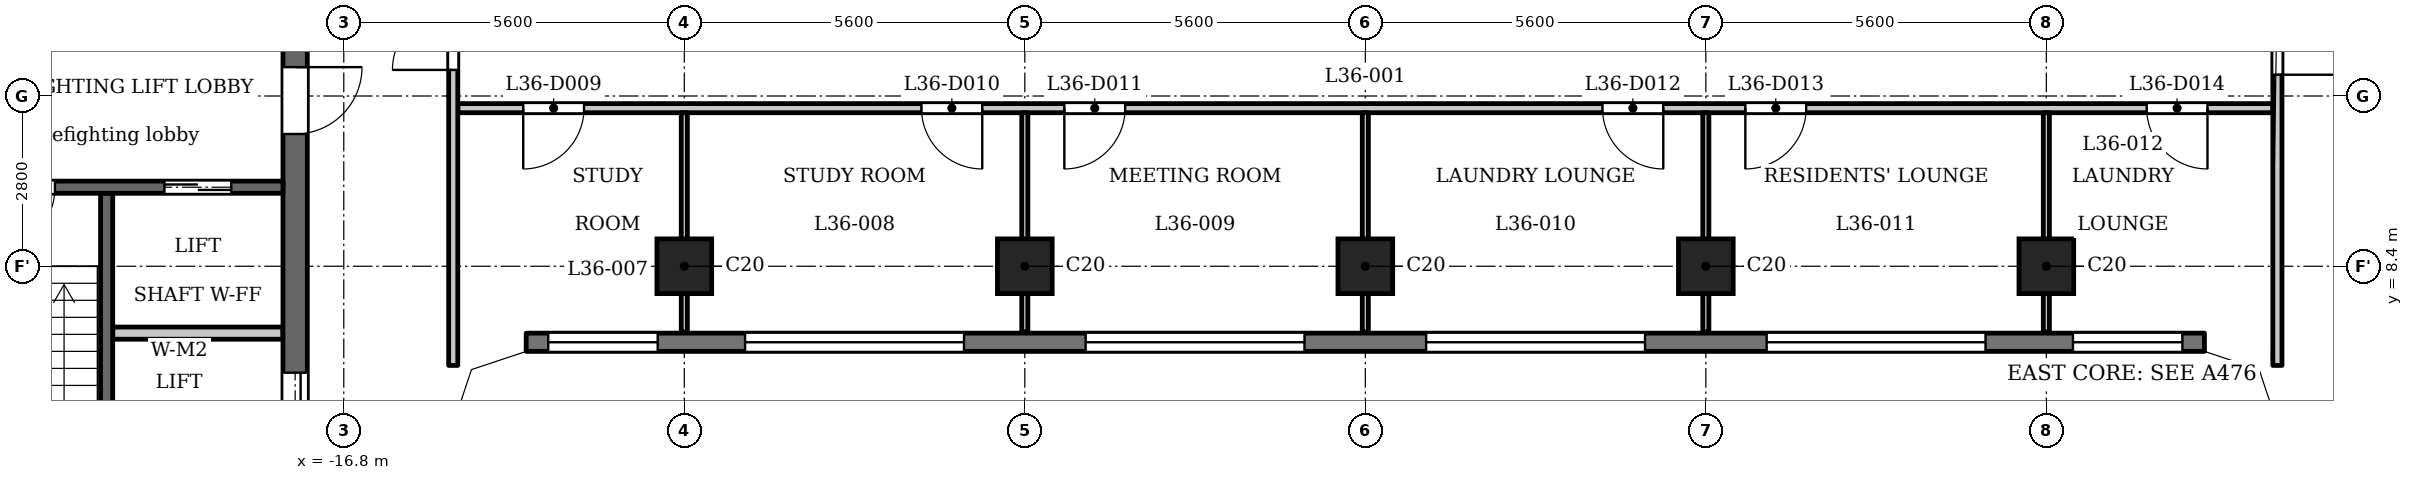
"""IFC4 building model, lengths in metres.
Left out: names, types, materials, properties, quantities, classifications, styles, units other than length and angle.
Written with IfcOpenShell. Run it as: python <this file> out.ifc"""

import sys

from ifc_helpers import new_model, si_unit, direction, frame, frame_2d, origin, origin_2d, place, context, subcontext, project, spatial, polyline, rectangle, outline, extrude, element, fill, save


model = new_model("IFC4")
c1 = context("Model", 3, precision=1e-05, world=origin(), true_north=direction((0.0, 1.0)))
c2 = subcontext(c1, "Body", "Model", "MODEL_VIEW")
j1 = project(units=[si_unit("LENGTHUNIT", "METRE"), si_unit("PLANEANGLEUNIT", "RADIAN")], contexts=[c1])
p1 = place(None, origin())
s1 = spatial("IfcSite", under=j1, at=p1, CompositionType="ELEMENT")
p2 = place(p1, origin())
s2 = spatial("IfcBuilding", under=s1, at=p2, CompositionType="ELEMENT")
p3 = place(p2, frame((0.0, 0.0, 143.1)))
s3 = spatial("IfcBuildingStorey", under=s2, at=p3, CompositionType="ELEMENT", Elevation=143.1)
for number, where, z_axis, x_axis in (
    (1, (-11.2, 8.4, 0.0), (0.0, 0.0, 1.0), (1.0, 0.0, 0.0)),
    (2, (-5.6, 8.4, 0.0), (0.0, 0.0, 1.0), (1.0, 0.0, 0.0)),
    (3, (0.0, 8.4, 0.0), (0.0, 0.0, 1.0), (1.0, 0.0, 0.0)),
    (4, (5.6, 8.4, 0.0), (0.0, 0.0, 1.0), (1.0, 0.0, 0.0)),
    (5, (11.2, 8.4, 0.0), (0.0, 0.0, 1.0), (1.0, 0.0, 0.0)),
):
    element("IfcColumn", number, at=place(p3, frame(where, z_axis=z_axis, x_axis=x_axis)), inside=s3, PredefinedType="COLUMN", context=c2, shape_type="SweptSolid", body=[
        extrude(rectangle(XDim=0.9, YDim=0.9, at=origin_2d()), origin(), (0.0, 0.0, 1.0), 3.5),
    ])
p4 = place(p3, frame((-13.8, 7.15, 0.0), z_axis=(0.0, 0.0, 1.0), x_axis=(1.0, 0.0, 0.0)))
e6 = element("IfcWall", 6, at=p4, inside=s3, PredefinedType="SOLIDWALL", context=c2, shape_type="SweptSolid", body=[
    extrude(rectangle(XDim=27.6, YDim=0.3, at=frame_2d((13.8, 0.0))), origin(), (0.0, 0.0, 1.0), 3.2),
])
p5 = place(p4, frame((0.363, 0.0, 0.9)))
e7 = element("IfcOpeningElement", 7, at=p5, cuts=e6, PredefinedType="OPENING", context=c2, shape_type="SweptSolid", body=[
    extrude(rectangle(XDim=1.8, YDim=1.25, at=frame_2d((0.9, 0.625))), frame((0.0, 0.16, 0.0), z_axis=(0.0, -1.0, 0.0), x_axis=(1.0, 0.0, 0.0)), (0.0, 0.0, 1.0), 0.32),
])
p6 = place(p4, frame((3.6, 0.0, 1.2)))
e8 = element("IfcOpeningElement", 8, at=p6, cuts=e6, PredefinedType="OPENING", context=c2, shape_type="SweptSolid", body=[
    extrude(rectangle(XDim=3.6, YDim=0.95, at=frame_2d((1.8, 0.475))), frame((0.0, 0.16, 0.0), z_axis=(0.0, -1.0, 0.0), x_axis=(1.0, 0.0, 0.0)), (0.0, 0.0, 1.0), 0.32),
])
p7 = place(p4, frame((9.2, 0.0, 1.2)))
e9 = element("IfcOpeningElement", 9, at=p7, cuts=e6, PredefinedType="OPENING", context=c2, shape_type="SweptSolid", body=[
    extrude(rectangle(XDim=3.6, YDim=0.95, at=frame_2d((1.8, 0.475))), frame((0.0, 0.16, 0.0), z_axis=(0.0, -1.0, 0.0), x_axis=(1.0, 0.0, 0.0)), (0.0, 0.0, 1.0), 0.32),
])
p8 = place(p4, frame((14.8, 0.0, 1.2)))
e10 = element("IfcOpeningElement", 10, at=p8, cuts=e6, PredefinedType="OPENING", context=c2, shape_type="SweptSolid", body=[
    extrude(rectangle(XDim=3.6, YDim=0.95, at=frame_2d((1.8, 0.475))), frame((0.0, 0.16, 0.0), z_axis=(0.0, -1.0, 0.0), x_axis=(1.0, 0.0, 0.0)), (0.0, 0.0, 1.0), 0.32),
])
p9 = place(p4, frame((20.4, 0.0, 1.2)))
e11 = element("IfcOpeningElement", 11, at=p9, cuts=e6, PredefinedType="OPENING", context=c2, shape_type="SweptSolid", body=[
    extrude(rectangle(XDim=3.6, YDim=0.95, at=frame_2d((1.8, 0.475))), frame((0.0, 0.16, 0.0), z_axis=(0.0, -1.0, 0.0), x_axis=(1.0, 0.0, 0.0)), (0.0, 0.0, 1.0), 0.32),
])
p10 = place(p4, frame((25.438, 0.0, 0.9)))
e12 = element("IfcOpeningElement", 12, at=p10, cuts=e6, PredefinedType="OPENING", context=c2, shape_type="SweptSolid", body=[
    extrude(rectangle(XDim=1.8, YDim=1.25, at=frame_2d((0.9, 0.625))), frame((0.0, 0.16, 0.0), z_axis=(0.0, -1.0, 0.0), x_axis=(1.0, 0.0, 0.0)), (0.0, 0.0, 1.0), 0.32),
])
p11 = place(p3, frame((-20.7, 2.6, 0.0), z_axis=(0.0, 0.0, 1.0), x_axis=(0.0, 1.0, 0.0)))
e13 = element("IfcWall", 13, at=p11, inside=s3, PredefinedType="SHEAR", context=c2, shape_type="SweptSolid", body=[
    extrude(rectangle(XDim=7.0, YDim=0.2, at=frame_2d((3.5, 0.0))), origin(), (0.0, 0.0, 1.0), 3.2),
])
p12 = place(p3, frame((-17.6, -12.45, 0.0), z_axis=(0.0, 0.0, 1.0), x_axis=(0.0, 1.0, 0.0)))
e14 = element("IfcWall", 14, at=p12, inside=s3, PredefinedType="SHEAR", context=c2, shape_type="SweptSolid", body=[
    extrude(rectangle(XDim=24.9, YDim=0.4, at=frame_2d((12.45, 0.0))), origin(), (0.0, 0.0, 1.0), 3.2),
])
p13 = place(p12, frame((8.65, 0.0, 0.0)))
e15 = element("IfcOpeningElement", 15, at=p13, cuts=e14, PredefinedType="OPENING", context=c2, shape_type="SweptSolid", body=[
    extrude(rectangle(XDim=0.9, YDim=2.1, at=frame_2d((0.45, 1.05))), frame((0.0, 0.21, 0.0), z_axis=(0.0, -1.0, 0.0), x_axis=(1.0, 0.0, 0.0)), (0.0, 0.0, 1.0), 0.42),
])
p14 = place(p12, frame((15.6, 0.0, 0.0)))
e16 = element("IfcOpeningElement", 16, at=p14, cuts=e14, PredefinedType="OPENING", context=c2, shape_type="SweptSolid", body=[
    extrude(rectangle(XDim=1.1, YDim=2.1, at=frame_2d((0.55, 1.05))), frame((0.0, 0.21, 0.0), z_axis=(0.0, -1.0, 0.0), x_axis=(1.0, 0.0, 0.0)), (0.0, 0.0, 1.0), 0.42),
])
p15 = place(p12, frame((18.0, 0.0, 0.0)))
e17 = element("IfcOpeningElement", 17, at=p15, cuts=e14, PredefinedType="OPENING", context=c2, shape_type="SweptSolid", body=[
    extrude(rectangle(XDim=1.1, YDim=2.1, at=frame_2d((0.55, 1.05))), frame((0.0, 0.21, 0.0), z_axis=(0.0, -1.0, 0.0), x_axis=(1.0, 0.0, 0.0)), (0.0, 0.0, 1.0), 0.42),
])
p16 = place(p12, frame((23.025, 0.0, 0.0)))
e18 = element("IfcOpeningElement", 18, at=p16, cuts=e14, PredefinedType="OPENING", context=c2, shape_type="SweptSolid", body=[
    extrude(rectangle(XDim=1.1, YDim=2.1, at=frame_2d((0.55, 1.05))), frame((0.0, 0.21, 0.0), z_axis=(0.0, -1.0, 0.0), x_axis=(1.0, 0.0, 0.0)), (0.0, 0.0, 1.0), 0.42),
])
p17 = place(p12, frame((0.775, 0.0, 0.0)))
e19 = element("IfcOpeningElement", 19, at=p17, cuts=e14, PredefinedType="OPENING", context=c2, shape_type="SweptSolid", body=[
    extrude(rectangle(XDim=1.1, YDim=2.1, at=frame_2d((0.55, 1.05))), frame((0.0, 0.21, 0.0), z_axis=(0.0, -1.0, 0.0), x_axis=(1.0, 0.0, 0.0)), (0.0, 0.0, 1.0), 0.42),
])
p18 = place(p12, frame((12.925, 0.0, 0.0)))
e20 = element("IfcOpeningElement", 20, at=p18, cuts=e14, PredefinedType="OPENING", context=c2, shape_type="SweptSolid", body=[
    extrude(rectangle(XDim=1.8, YDim=2.1, at=frame_2d((0.9, 1.05))), frame((0.0, 0.21, 0.0), z_axis=(0.0, -1.0, 0.0), x_axis=(1.0, 0.0, 0.0)), (0.0, 0.0, 1.0), 0.42),
])
p19 = place(p3, frame((-17.8, 7.3, 0.0), z_axis=(0.0, 0.0, 1.0), x_axis=(-1.0, 0.0, 0.0)))
e21 = element("IfcWall", 21, at=p19, inside=s3, PredefinedType="PARTITIONING", context=c2, shape_type="SweptSolid", body=[
    extrude(rectangle(XDim=2.8, YDim=0.2, at=frame_2d((1.4, 0.0))), origin(), (0.0, 0.0, 1.0), 3.2),
])
p20 = place(p3, frame((-17.8, 9.7, 0.0), z_axis=(0.0, 0.0, 1.0), x_axis=(-1.0, 0.0, 0.0)))
e22 = element("IfcWall", 22, at=p20, inside=s3, PredefinedType="SHEAR", context=c2, shape_type="SweptSolid", body=[
    extrude(rectangle(XDim=8.45, YDim=0.2, at=frame_2d((4.225, 0.0))), origin(), (0.0, 0.0, 1.0), 3.2),
])
p21 = place(p20, frame((0.85, 0.0, 0.0)))
e23 = element("IfcOpeningElement", 23, at=p21, cuts=e22, PredefinedType="OPENING", context=c2, shape_type="SweptSolid", body=[
    extrude(rectangle(XDim=1.1, YDim=2.1, at=frame_2d((0.55, 1.05))), frame((0.0, 0.11, 0.0), z_axis=(0.0, -1.0, 0.0), x_axis=(1.0, 0.0, 0.0)), (0.0, 0.0, 1.0), 0.22),
])
p22 = place(p20, frame((3.75, 0.0, 0.0)))
e24 = element("IfcOpeningElement", 24, at=p22, cuts=e22, PredefinedType="OPENING", context=c2, shape_type="SweptSolid", body=[
    extrude(rectangle(XDim=1.1, YDim=2.1, at=frame_2d((0.55, 1.05))), frame((0.0, 0.11, 0.0), z_axis=(0.0, -1.0, 0.0), x_axis=(1.0, 0.0, 0.0)), (0.0, 0.0, 1.0), 0.22),
])
p23 = place(p3, frame((-14.925, 11.0, 0.0), z_axis=(0.0, 0.0, 1.0), x_axis=(1.0, 0.0, 0.0)))
e25 = element("IfcWall", 25, at=p23, inside=s3, PredefinedType="PARTITIONING", context=c2, shape_type="SweptSolid", body=[
    extrude(rectangle(XDim=29.85, YDim=0.15, at=frame_2d((14.925, 0.0))), origin(), (0.0, 0.0, 1.0), 3.2),
])
p24 = place(p23, frame((1.076, 0.0, 0.0)))
e26 = element("IfcOpeningElement", 26, at=p24, cuts=e25, PredefinedType="OPENING", context=c2, shape_type="SweptSolid", body=[
    extrude(rectangle(XDim=1.0, YDim=2.1, at=frame_2d((0.5, 1.05))), frame((0.0, 0.085, 0.0), z_axis=(0.0, -1.0, 0.0), x_axis=(1.0, 0.0, 0.0)), (0.0, 0.0, 1.0), 0.17),
])
p25 = place(p23, frame((7.625, 0.0, 0.0)))
e27 = element("IfcOpeningElement", 27, at=p25, cuts=e25, PredefinedType="OPENING", context=c2, shape_type="SweptSolid", body=[
    extrude(rectangle(XDim=1.0, YDim=2.1, at=frame_2d((0.5, 1.05))), frame((0.0, 0.085, 0.0), z_axis=(0.0, -1.0, 0.0), x_axis=(1.0, 0.0, 0.0)), (0.0, 0.0, 1.0), 0.17),
])
p26 = place(p23, frame((9.975, 0.0, 0.0)))
e28 = element("IfcOpeningElement", 28, at=p26, cuts=e25, PredefinedType="OPENING", context=c2, shape_type="SweptSolid", body=[
    extrude(rectangle(XDim=1.0, YDim=2.1, at=frame_2d((0.5, 1.05))), frame((0.0, 0.085, 0.0), z_axis=(0.0, -1.0, 0.0), x_axis=(1.0, 0.0, 0.0)), (0.0, 0.0, 1.0), 0.17),
])
p27 = place(p23, frame((18.825, 0.0, 0.0)))
e29 = element("IfcOpeningElement", 29, at=p27, cuts=e25, PredefinedType="OPENING", context=c2, shape_type="SweptSolid", body=[
    extrude(rectangle(XDim=1.0, YDim=2.1, at=frame_2d((0.5, 1.05))), frame((0.0, 0.085, 0.0), z_axis=(0.0, -1.0, 0.0), x_axis=(1.0, 0.0, 0.0)), (0.0, 0.0, 1.0), 0.17),
])
p28 = place(p23, frame((21.175, 0.0, 0.0)))
e30 = element("IfcOpeningElement", 30, at=p28, cuts=e25, PredefinedType="OPENING", context=c2, shape_type="SweptSolid", body=[
    extrude(rectangle(XDim=1.0, YDim=2.1, at=frame_2d((0.5, 1.05))), frame((0.0, 0.085, 0.0), z_axis=(0.0, -1.0, 0.0), x_axis=(1.0, 0.0, 0.0)), (0.0, 0.0, 1.0), 0.17),
])
p29 = place(p23, frame((27.775, 0.0, 0.0)))
e31 = element("IfcOpeningElement", 31, at=p29, cuts=e25, PredefinedType="OPENING", context=c2, shape_type="SweptSolid", body=[
    extrude(rectangle(XDim=1.0, YDim=2.1, at=frame_2d((0.5, 1.05))), frame((0.0, 0.085, 0.0), z_axis=(0.0, -1.0, 0.0), x_axis=(1.0, 0.0, 0.0)), (0.0, 0.0, 1.0), 0.17),
])
p30 = place(p3, frame((-15.0, 6.769, 0.0), z_axis=(0.0, 0.0, 1.0), x_axis=(0.0, 1.0, 0.0)))
e32 = element("IfcWall", 32, at=p30, inside=s3, PredefinedType="PARTITIONING", context=c2, shape_type="SweptSolid", body=[
    extrude(rectangle(XDim=6.356, YDim=0.15, at=frame_2d((3.178, 0.0))), origin(), (0.0, 0.0, 1.0), 3.2),
])
p31 = place(p30, frame((4.86, 0.0, 0.0)))
e33 = element("IfcOpeningElement", 33, at=p31, cuts=e32, PredefinedType="OPENING", context=c2, shape_type="SweptSolid", body=[
    extrude(rectangle(XDim=1.0, YDim=2.1, at=frame_2d((0.5, 1.05))), frame((0.0, 0.085, 0.0), z_axis=(0.0, -1.0, 0.0), x_axis=(1.0, 0.0, 0.0)), (0.0, 0.0, 1.0), 0.17),
])
for number, where, z_axis, x_axis in (
    (34, (-11.2, 7.32, 0.0), (0.0, 0.0, 1.0), (0.0, 1.0, 0.0)),
    (35, (-5.6, 7.32, 0.0), (0.0, 0.0, 1.0), (0.0, 1.0, 0.0)),
    (36, (0.0, 7.32, 0.0), (0.0, 0.0, 1.0), (0.0, 1.0, 0.0)),
    (37, (5.6, 7.32, 0.0), (0.0, 0.0, 1.0), (0.0, 1.0, 0.0)),
    (38, (11.2, 7.32, 0.0), (0.0, 0.0, 1.0), (0.0, 1.0, 0.0)),
):
    element("IfcWall", number, at=place(p3, frame(where, z_axis=z_axis, x_axis=x_axis)), inside=s3, PredefinedType="PARTITIONING", context=c2, shape_type="SweptSolid", body=[
        extrude(rectangle(XDim=3.605, YDim=0.1, at=frame_2d((1.802, 0.0))), origin(), (0.0, 0.0, 1.0), 3.2),
    ])
p32 = place(p3, frame((15.0, 6.769, 0.0), z_axis=(0.0, 0.0, 1.0), x_axis=(0.0, 1.0, 0.0)))
e39 = element("IfcWall", 39, at=p32, inside=s3, PredefinedType="PARTITIONING", context=c2, shape_type="SweptSolid", body=[
    extrude(rectangle(XDim=6.356, YDim=0.15, at=frame_2d((3.178, 0.0))), origin(), (0.0, 0.0, 1.0), 3.2),
])
p33 = place(p32, frame((4.781, 0.0, 0.0)))
e40 = element("IfcOpeningElement", 40, at=p33, cuts=e39, PredefinedType="OPENING", context=c2, shape_type="SweptSolid", body=[
    extrude(rectangle(XDim=1.0, YDim=2.1, at=frame_2d((0.5, 1.05))), frame((0.0, 0.085, 0.0), z_axis=(0.0, -1.0, 0.0), x_axis=(1.0, 0.0, 0.0)), (0.0, 0.0, 1.0), 0.17),
])
p34 = place(p3, origin())
e41 = element("IfcWall", 41, at=p34, inside=s3, PredefinedType="SOLIDWALL", context=c2, shape_type="SweptSolid", body=[
    extrude(outline(polyline([(-13.849, 7.3), (-14.937, 6.937), (-15.3, 5.849), (-15.3, 5.8), (-15.0, 5.8), (-14.7, 6.7), (-13.8, 7.0), (-13.8, 7.3), (-13.849, 7.3)])), origin(), (0.0, 0.0, 1.0), 3.2),
])
e42 = element("IfcWall", 42, at=p34, inside=s3, PredefinedType="SOLIDWALL", context=c2, shape_type="SweptSolid", body=[
    extrude(outline(polyline([(14.937, 6.937), (13.849, 7.3), (13.8, 7.3), (13.8, 7.0), (14.7, 6.7), (15.0, 5.8), (15.3, 5.8), (15.3, 5.849), (14.937, 6.937)])), origin(), (0.0, 0.0, 1.0), 3.2),
])
p35 = place(p15, origin())
e43 = element("IfcDoor", 43, at=p35, inside=s3, OperationType="DOUBLE_DOOR_SLIDING", PredefinedType="DOOR", context=c2, shape_type="SweptSolid", body=[
    extrude(rectangle(XDim=1.1, YDim=2.1, at=frame_2d((0.55, 1.05))), frame((0.0, 0.025, 0.0), z_axis=(0.0, -1.0, 0.0), x_axis=(1.0, 0.0, 0.0)), (0.0, 0.0, 1.0), 0.05),
])
fill(e17, e43)
p36 = place(p21, origin())
e44 = element("IfcDoor", 44, at=p36, inside=s3, OperationType="DOUBLE_DOOR_SLIDING", PredefinedType="DOOR", context=c2, shape_type="SweptSolid", body=[
    extrude(rectangle(XDim=1.1, YDim=2.1, at=frame_2d((0.55, 1.05))), frame((0.0, 0.025, 0.0), z_axis=(0.0, -1.0, 0.0), x_axis=(1.0, 0.0, 0.0)), (0.0, 0.0, 1.0), 0.05),
])
fill(e23, e44)
p37 = place(p16, origin())
e45 = element("IfcDoor", 45, at=p37, inside=s3, OperationType="SINGLE_SWING_RIGHT", PredefinedType="DOOR", context=c2, shape_type="SweptSolid", body=[
    extrude(rectangle(XDim=1.1, YDim=2.1, at=frame_2d((0.55, 1.05))), frame((0.0, 0.025, 0.0), z_axis=(0.0, -1.0, 0.0), x_axis=(1.0, 0.0, 0.0)), (0.0, 0.0, 1.0), 0.05),
])
fill(e18, e45)
p38 = place(p22, origin())
e46 = element("IfcDoor", 46, at=p38, inside=s3, OperationType="SINGLE_SWING_LEFT", PredefinedType="DOOR", context=c2, shape_type="SweptSolid", body=[
    extrude(rectangle(XDim=1.1, YDim=2.1, at=frame_2d((0.55, 1.05))), frame((0.0, 0.025, 0.0), z_axis=(0.0, -1.0, 0.0), x_axis=(1.0, 0.0, 0.0)), (0.0, 0.0, 1.0), 0.05),
])
fill(e24, e46)
p39 = place(p31, origin())
e47 = element("IfcDoor", 47, at=p39, inside=s3, OperationType="SINGLE_SWING_RIGHT", PredefinedType="DOOR", context=c2, shape_type="SweptSolid", body=[
    extrude(rectangle(XDim=1.0, YDim=2.1, at=frame_2d((0.5, 1.05))), frame((0.0, 0.025, 0.0), z_axis=(0.0, -1.0, 0.0), x_axis=(1.0, 0.0, 0.0)), (0.0, 0.0, 1.0), 0.05),
])
fill(e33, e47)
p40 = place(p33, origin())
e48 = element("IfcDoor", 48, at=p40, inside=s3, OperationType="SINGLE_SWING_LEFT", PredefinedType="DOOR", context=c2, shape_type="SweptSolid", body=[
    extrude(rectangle(XDim=1.0, YDim=2.1, at=frame_2d((0.5, 1.05))), frame((0.0, 0.025, 0.0), z_axis=(0.0, -1.0, 0.0), x_axis=(1.0, 0.0, 0.0)), (0.0, 0.0, 1.0), 0.05),
])
fill(e40, e48)
p41 = place(p24, origin())
e49 = element("IfcDoor", 49, at=p41, inside=s3, OperationType="SINGLE_SWING_LEFT", PredefinedType="DOOR", context=c2, shape_type="SweptSolid", body=[
    extrude(rectangle(XDim=1.0, YDim=2.1, at=frame_2d((0.5, 1.05))), frame((0.0, 0.025, 0.0), z_axis=(0.0, -1.0, 0.0), x_axis=(1.0, 0.0, 0.0)), (0.0, 0.0, 1.0), 0.05),
])
fill(e26, e49)
p42 = place(p25, origin())
e50 = element("IfcDoor", 50, at=p42, inside=s3, OperationType="SINGLE_SWING_RIGHT", PredefinedType="DOOR", context=c2, shape_type="SweptSolid", body=[
    extrude(rectangle(XDim=1.0, YDim=2.1, at=frame_2d((0.5, 1.05))), frame((0.0, 0.025, 0.0), z_axis=(0.0, -1.0, 0.0), x_axis=(1.0, 0.0, 0.0)), (0.0, 0.0, 1.0), 0.05),
])
fill(e27, e50)
p43 = place(p26, origin())
e51 = element("IfcDoor", 51, at=p43, inside=s3, OperationType="SINGLE_SWING_LEFT", PredefinedType="DOOR", context=c2, shape_type="SweptSolid", body=[
    extrude(rectangle(XDim=1.0, YDim=2.1, at=frame_2d((0.5, 1.05))), frame((0.0, 0.025, 0.0), z_axis=(0.0, -1.0, 0.0), x_axis=(1.0, 0.0, 0.0)), (0.0, 0.0, 1.0), 0.05),
])
fill(e28, e51)
p44 = place(p27, origin())
e52 = element("IfcDoor", 52, at=p44, inside=s3, OperationType="SINGLE_SWING_RIGHT", PredefinedType="DOOR", context=c2, shape_type="SweptSolid", body=[
    extrude(rectangle(XDim=1.0, YDim=2.1, at=frame_2d((0.5, 1.05))), frame((0.0, 0.025, 0.0), z_axis=(0.0, -1.0, 0.0), x_axis=(1.0, 0.0, 0.0)), (0.0, 0.0, 1.0), 0.05),
])
fill(e29, e52)
p45 = place(p28, origin())
e53 = element("IfcDoor", 53, at=p45, inside=s3, OperationType="SINGLE_SWING_LEFT", PredefinedType="DOOR", context=c2, shape_type="SweptSolid", body=[
    extrude(rectangle(XDim=1.0, YDim=2.1, at=frame_2d((0.5, 1.05))), frame((0.0, 0.025, 0.0), z_axis=(0.0, -1.0, 0.0), x_axis=(1.0, 0.0, 0.0)), (0.0, 0.0, 1.0), 0.05),
])
fill(e30, e53)
p46 = place(p29, origin())
e54 = element("IfcDoor", 54, at=p46, inside=s3, OperationType="SINGLE_SWING_RIGHT", PredefinedType="DOOR", context=c2, shape_type="SweptSolid", body=[
    extrude(rectangle(XDim=1.0, YDim=2.1, at=frame_2d((0.5, 1.05))), frame((0.0, 0.025, 0.0), z_axis=(0.0, -1.0, 0.0), x_axis=(1.0, 0.0, 0.0)), (0.0, 0.0, 1.0), 0.05),
])
fill(e31, e54)
p47 = place(p5, origin())
e55 = element("IfcWindow", 55, at=p47, inside=s3, PartitioningType="SINGLE_PANEL", PredefinedType="WINDOW", context=c2, shape_type="SweptSolid", body=[
    extrude(rectangle(XDim=1.8, YDim=1.25, at=frame_2d((0.9, 0.625))), frame((0.0, 0.03, 0.0), z_axis=(0.0, -1.0, 0.0), x_axis=(1.0, 0.0, 0.0)), (0.0, 0.0, 1.0), 0.06),
])
fill(e7, e55)
p48 = place(p6, origin())
e56 = element("IfcWindow", 56, at=p48, inside=s3, PartitioningType="SINGLE_PANEL", PredefinedType="WINDOW", context=c2, shape_type="SweptSolid", body=[
    extrude(rectangle(XDim=3.6, YDim=0.95, at=frame_2d((1.8, 0.475))), frame((0.0, 0.03, 0.0), z_axis=(0.0, -1.0, 0.0), x_axis=(1.0, 0.0, 0.0)), (0.0, 0.0, 1.0), 0.06),
])
fill(e8, e56)
p49 = place(p7, origin())
e57 = element("IfcWindow", 57, at=p49, inside=s3, PartitioningType="SINGLE_PANEL", PredefinedType="WINDOW", context=c2, shape_type="SweptSolid", body=[
    extrude(rectangle(XDim=3.6, YDim=0.95, at=frame_2d((1.8, 0.475))), frame((0.0, 0.03, 0.0), z_axis=(0.0, -1.0, 0.0), x_axis=(1.0, 0.0, 0.0)), (0.0, 0.0, 1.0), 0.06),
])
fill(e9, e57)
p50 = place(p8, origin())
e58 = element("IfcWindow", 58, at=p50, inside=s3, PartitioningType="SINGLE_PANEL", PredefinedType="WINDOW", context=c2, shape_type="SweptSolid", body=[
    extrude(rectangle(XDim=3.6, YDim=0.95, at=frame_2d((1.8, 0.475))), frame((0.0, 0.03, 0.0), z_axis=(0.0, -1.0, 0.0), x_axis=(1.0, 0.0, 0.0)), (0.0, 0.0, 1.0), 0.06),
])
fill(e10, e58)
p51 = place(p9, origin())
e59 = element("IfcWindow", 59, at=p51, inside=s3, PartitioningType="SINGLE_PANEL", PredefinedType="WINDOW", context=c2, shape_type="SweptSolid", body=[
    extrude(rectangle(XDim=3.6, YDim=0.95, at=frame_2d((1.8, 0.475))), frame((0.0, 0.03, 0.0), z_axis=(0.0, -1.0, 0.0), x_axis=(1.0, 0.0, 0.0)), (0.0, 0.0, 1.0), 0.06),
])
fill(e11, e59)
p52 = place(p10, origin())
e60 = element("IfcWindow", 60, at=p52, inside=s3, PartitioningType="SINGLE_PANEL", PredefinedType="WINDOW", context=c2, shape_type="SweptSolid", body=[
    extrude(rectangle(XDim=1.8, YDim=1.25, at=frame_2d((0.9, 0.625))), frame((0.0, 0.03, 0.0), z_axis=(0.0, -1.0, 0.0), x_axis=(1.0, 0.0, 0.0)), (0.0, 0.0, 1.0), 0.06),
])
fill(e12, e60)
save(model, sys.argv[1])
